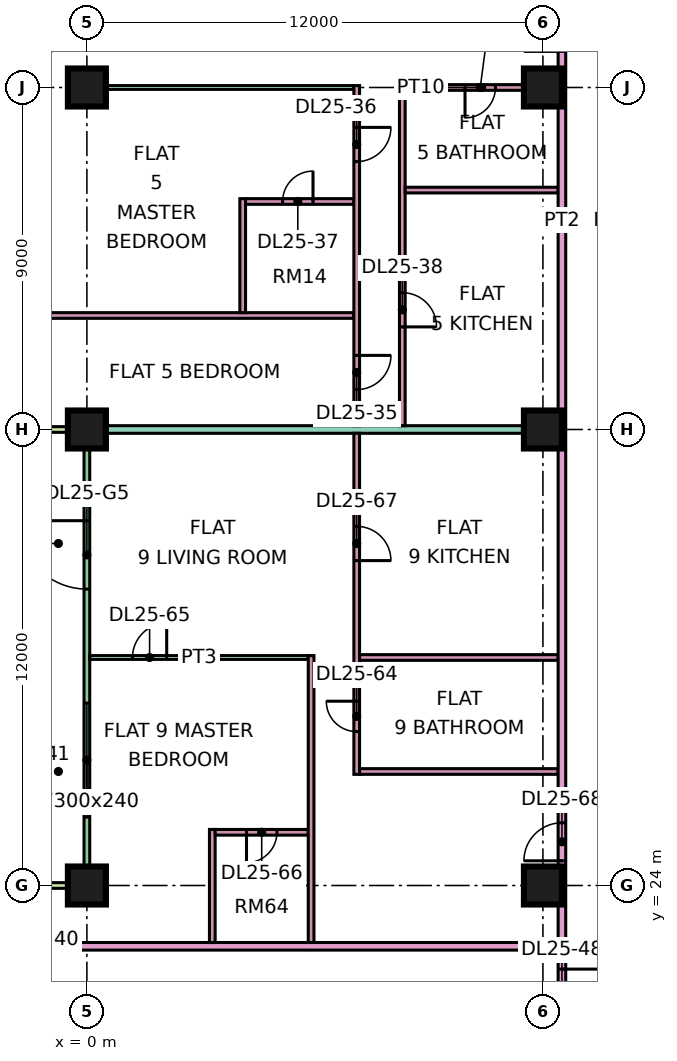
"""IFC4 building model, lengths in metres.
Left out: names, types, materials, properties, quantities, classifications, styles, units other than length and angle.
Written with IfcOpenShell. Run it as: python <this file> out.ifc"""

import sys

from ifc_helpers import new_model, si_unit, direction, frame, frame_2d, origin, origin_2d, place, context, subcontext, project, spatial, rectangle, extrude, element, fill, save


model = new_model("IFC4")
c1 = context("Model", 3, precision=1e-05, world=origin(), true_north=direction((0.0, 1.0)))
c2 = subcontext(c1, "Body", "Model", "MODEL_VIEW")
j1 = project(units=[si_unit("LENGTHUNIT", "METRE"), si_unit("PLANEANGLEUNIT", "RADIAN")], contexts=[c1])
p1 = place(None, origin())
s1 = spatial("IfcSite", under=j1, at=p1, CompositionType="ELEMENT")
p2 = place(p1, origin())
s2 = spatial("IfcBuilding", under=s1, at=p2, CompositionType="ELEMENT")
p3 = place(p2, frame((0.0, 0.0, 110.65)))
s3 = spatial("IfcBuildingStorey", under=s2, at=p3, CompositionType="ELEMENT", Elevation=110.65)
p4 = place(p3, frame((0.0, 24.0, 0.0), z_axis=(0.0, 0.0, 1.0), x_axis=(1.0, 0.0, 0.0)))
e1 = element("IfcColumn", 1, at=p4, inside=s3, PredefinedType="COLUMN", context=c2, shape_type="SweptSolid", body=[
    extrude(rectangle(XDim=1.0, YDim=1.0, at=origin_2d()), origin(), (0.0, 0.0, 1.0), 3.75),
])
p5 = place(p3, frame((0.0, 36.0, 0.0), z_axis=(0.0, 0.0, 1.0), x_axis=(1.0, 0.0, 0.0)))
e2 = element("IfcColumn", 2, at=p5, inside=s3, PredefinedType="COLUMN", context=c2, shape_type="SweptSolid", body=[
    extrude(rectangle(XDim=1.0, YDim=1.0, at=origin_2d()), origin(), (0.0, 0.0, 1.0), 3.75),
])
p6 = place(p3, frame((0.0, 45.0, 0.0), z_axis=(0.0, 0.0, 1.0), x_axis=(1.0, 0.0, 0.0)))
e3 = element("IfcColumn", 3, at=p6, inside=s3, PredefinedType="COLUMN", context=c2, shape_type="SweptSolid", body=[
    extrude(rectangle(XDim=1.0, YDim=1.0, at=origin_2d()), origin(), (0.0, 0.0, 1.0), 3.75),
])
for number, where, z_axis, x_axis in (
    (4, (12.0, 24.0, 0.0), (0.0, 0.0, 1.0), (1.0, 0.0, 0.0)),
    (5, (12.0, 36.0, 0.0), (0.0, 0.0, 1.0), (1.0, 0.0, 0.0)),
    (6, (12.0, 45.0, 0.0), (0.0, 0.0, 1.0), (1.0, 0.0, 0.0)),
):
    element("IfcColumn", number, at=place(p3, frame(where, z_axis=z_axis, x_axis=x_axis)), inside=s3, PredefinedType="COLUMN", context=c2, shape_type="SweptSolid", body=[
        extrude(rectangle(XDim=1.0, YDim=1.0, at=origin_2d()), origin(), (0.0, 0.0, 1.0), 3.75),
    ])
p7 = place(p3, frame((0.0, 35.925, 0.0), z_axis=(0.0, 0.0, 1.0), x_axis=(0.0, -1.0, 0.0)))
e7 = element("IfcWall", 7, at=p7, inside=s3, PredefinedType="SOLIDWALL", context=c2, shape_type="SweptSolid", body=[
    extrude(rectangle(XDim=11.85, YDim=0.15, at=frame_2d((5.925, 0.0))), origin(), (0.0, 0.0, 1.0), 3.35),
])
p8 = place(p7, frame((2.325, 0.0, 0.0)))
e8 = element("IfcOpeningElement", 8, at=p8, cuts=e7, PredefinedType="OPENING", context=c2, shape_type="SweptSolid", body=[
    extrude(rectangle(XDim=1.8, YDim=2.4, at=frame_2d((0.9, 1.2))), frame((0.0, 0.085, 0.0), z_axis=(0.0, -1.0, 0.0), x_axis=(1.0, 0.0, 0.0)), (0.0, 0.0, 1.0), 0.17),
])
p9 = place(p7, frame((7.125, 0.0, 0.45)))
e9 = element("IfcOpeningElement", 9, at=p9, cuts=e7, PredefinedType="OPENING", context=c2, shape_type="SweptSolid", body=[
    extrude(rectangle(XDim=3.0, YDim=2.4, at=frame_2d((1.5, 1.2))), frame((0.0, 0.085, 0.0), z_axis=(0.0, -1.0, 0.0), x_axis=(1.0, 0.0, 0.0)), (0.0, 0.0, 1.0), 0.17),
])
for number, where, z_axis, x_axis in (
    (10, (-1.5, 36.0, 0.0), (0.0, 0.0, 1.0), (1.0, 0.0, 0.0)),
    (11, (-1.5, 24.0, 0.0), (0.0, 0.0, 1.0), (1.0, 0.0, 0.0)),
):
    element("IfcWall", number, at=place(p3, frame(where, z_axis=z_axis, x_axis=x_axis)), inside=s3, PredefinedType="SOLIDWALL", context=c2, shape_type="SweptSolid", body=[
        extrude(rectangle(XDim=1.5, YDim=0.15, at=frame_2d((0.75, 0.0))), origin(), (0.0, 0.0, 1.0), 3.35),
    ])
p10 = place(p3, frame((-1.351, 39.0, 0.0), z_axis=(0.0, 0.0, 1.0), x_axis=(1.0, 0.0, 0.0)))
e12 = element("IfcWall", 12, at=p10, inside=s3, PredefinedType="PARTITIONING", context=c2, shape_type="SweptSolid", body=[
    extrude(rectangle(XDim=8.376, YDim=0.15, at=frame_2d((4.188, 0.0))), origin(), (0.0, 0.0, 1.0), 3.35),
])
p11 = place(p3, frame((-1.35, 22.4, 0.0), z_axis=(0.0, 0.0, 1.0), x_axis=(1.0, 0.0, 0.0)))
e13 = element("IfcWall", 13, at=p11, inside=s3, PredefinedType="PARTITIONING", context=c2, shape_type="SweptSolid", body=[
    extrude(rectangle(XDim=13.75, YDim=0.2, at=frame_2d((6.875, 0.0))), origin(), (0.0, 0.0, 1.0), 3.35),
])
e14 = element("IfcWall", 14, at=p5, inside=s3, PredefinedType="PARTITIONING", context=c2, shape_type="SweptSolid", body=[
    extrude(rectangle(XDim=12.4, YDim=0.2, at=frame_2d((6.2, 0.0))), origin(), (0.0, 0.0, 1.0), 3.35),
])
e15 = element("IfcWall", 15, at=p6, inside=s3, PredefinedType="PARTITIONING", context=c2, shape_type="SweptSolid", body=[
    extrude(rectangle(XDim=7.025, YDim=0.1, at=frame_2d((3.512, 0.0))), origin(), (0.0, 0.0, 1.0), 3.35),
])
p12 = place(p3, frame((0.074, 30.0, 0.0), z_axis=(0.0, 0.0, 1.0), x_axis=(1.0, 0.0, 0.0)))
e16 = element("IfcWall", 16, at=p12, inside=s3, PredefinedType="PARTITIONING", context=c2, shape_type="SweptSolid", body=[
    extrude(rectangle(XDim=5.751, YDim=0.1, at=frame_2d((2.875, 0.0))), origin(), (0.0, 0.0, 1.0), 3.35),
])
p13 = place(p12, frame((1.126, 0.0, 0.0)))
e17 = element("IfcOpeningElement", 17, at=p13, cuts=e16, PredefinedType="OPENING", context=c2, shape_type="SweptSolid", body=[
    extrude(rectangle(XDim=0.9, YDim=2.1, at=frame_2d((0.45, 1.05))), frame((0.0, 0.06, 0.0), z_axis=(0.0, -1.0, 0.0), x_axis=(1.0, 0.0, 0.0)), (0.0, 0.0, 1.0), 0.12),
])
p14 = place(p3, frame((3.3, 22.5, 0.0), z_axis=(0.0, 0.0, 1.0), x_axis=(0.0, 1.0, 0.0)))
e18 = element("IfcWall", 18, at=p14, inside=s3, PredefinedType="PARTITIONING", context=c2, shape_type="SweptSolid", body=[
    extrude(rectangle(XDim=2.975, YDim=0.15, at=frame_2d((1.488, 0.0))), origin(), (0.0, 0.0, 1.0), 3.35),
])
p15 = place(p3, frame((3.375, 25.4, 0.0), z_axis=(0.0, 0.0, 1.0), x_axis=(1.0, 0.0, 0.0)))
e19 = element("IfcWall", 19, at=p15, inside=s3, PredefinedType="PARTITIONING", context=c2, shape_type="SweptSolid", body=[
    extrude(rectangle(XDim=2.45, YDim=0.15, at=frame_2d((1.225, 0.0))), origin(), (0.0, 0.0, 1.0), 3.35),
])
p16 = place(p15, frame((0.825, 0.0, 0.0)))
e20 = element("IfcOpeningElement", 20, at=p16, cuts=e19, PredefinedType="OPENING", context=c2, shape_type="SweptSolid", body=[
    extrude(rectangle(XDim=0.8, YDim=2.1, at=frame_2d((0.4, 1.05))), frame((0.0, 0.085, 0.0), z_axis=(0.0, -1.0, 0.0), x_axis=(1.0, 0.0, 0.0)), (0.0, 0.0, 1.0), 0.17),
])
p17 = place(p3, frame((4.1, 39.075, 0.0), z_axis=(0.0, 0.0, 1.0), x_axis=(0.0, 1.0, 0.0)))
e21 = element("IfcWall", 21, at=p17, inside=s3, PredefinedType="PARTITIONING", context=c2, shape_type="SweptSolid", body=[
    extrude(rectangle(XDim=3.0, YDim=0.15, at=frame_2d((1.5, 0.0))), origin(), (0.0, 0.0, 1.0), 3.35),
])
p18 = place(p3, frame((4.175, 42.0, 0.0), z_axis=(0.0, 0.0, 1.0), x_axis=(1.0, 0.0, 0.0)))
e22 = element("IfcWall", 22, at=p18, inside=s3, PredefinedType="PARTITIONING", context=c2, shape_type="SweptSolid", body=[
    extrude(rectangle(XDim=2.85, YDim=0.15, at=frame_2d((1.425, 0.0))), origin(), (0.0, 0.0, 1.0), 3.35),
])
p19 = place(p18, frame((0.975, 0.0, 0.0)))
e23 = element("IfcOpeningElement", 23, at=p19, cuts=e22, PredefinedType="OPENING", context=c2, shape_type="SweptSolid", body=[
    extrude(rectangle(XDim=0.8, YDim=2.1, at=frame_2d((0.4, 1.05))), frame((0.0, 0.085, 0.0), z_axis=(0.0, -1.0, 0.0), x_axis=(1.0, 0.0, 0.0)), (0.0, 0.0, 1.0), 0.17),
])
p20 = place(p3, frame((5.9, 22.5, 0.0), z_axis=(0.0, 0.0, 1.0), x_axis=(0.0, 1.0, 0.0)))
e24 = element("IfcWall", 24, at=p20, inside=s3, PredefinedType="PARTITIONING", context=c2, shape_type="SweptSolid", body=[
    extrude(rectangle(XDim=7.55, YDim=0.15, at=frame_2d((3.775, 0.0))), origin(), (0.0, 0.0, 1.0), 3.35),
])
p21 = place(p3, frame((7.1, 26.925, 0.0), z_axis=(0.0, 0.0, 1.0), x_axis=(0.0, 1.0, 0.0)))
e25 = element("IfcWall", 25, at=p21, inside=s3, PredefinedType="PARTITIONING", context=c2, shape_type="SweptSolid", body=[
    extrude(rectangle(XDim=8.975, YDim=0.15, at=frame_2d((4.487, 0.0))), origin(), (0.0, 0.0, 1.0), 3.35),
])
p22 = place(p21, frame((1.125, 0.0, 0.0)))
e26 = element("IfcOpeningElement", 26, at=p22, cuts=e25, PredefinedType="OPENING", context=c2, shape_type="SweptSolid", body=[
    extrude(rectangle(XDim=0.8, YDim=2.1, at=frame_2d((0.4, 1.05))), frame((0.0, 0.085, 0.0), z_axis=(0.0, -1.0, 0.0), x_axis=(1.0, 0.0, 0.0)), (0.0, 0.0, 1.0), 0.17),
])
p23 = place(p21, frame((5.625, 0.0, 0.0)))
e27 = element("IfcOpeningElement", 27, at=p23, cuts=e25, PredefinedType="OPENING", context=c2, shape_type="SweptSolid", body=[
    extrude(rectangle(XDim=0.9, YDim=2.1, at=frame_2d((0.45, 1.05))), frame((0.0, 0.085, 0.0), z_axis=(0.0, -1.0, 0.0), x_axis=(1.0, 0.0, 0.0)), (0.0, 0.0, 1.0), 0.17),
])
p24 = place(p3, frame((7.1, 36.1, 0.0), z_axis=(0.0, 0.0, 1.0), x_axis=(0.0, 1.0, 0.0)))
e28 = element("IfcWall", 28, at=p24, inside=s3, PredefinedType="PARTITIONING", context=c2, shape_type="SweptSolid", body=[
    extrude(rectangle(XDim=8.95, YDim=0.15, at=frame_2d((4.475, 0.0))), origin(), (0.0, 0.0, 1.0), 3.35),
])
p25 = place(p24, frame((0.95, 0.0, 0.0)))
e29 = element("IfcOpeningElement", 29, at=p25, cuts=e28, PredefinedType="OPENING", context=c2, shape_type="SweptSolid", body=[
    extrude(rectangle(XDim=0.9, YDim=2.1, at=frame_2d((0.45, 1.05))), frame((0.0, 0.085, 0.0), z_axis=(0.0, -1.0, 0.0), x_axis=(1.0, 0.0, 0.0)), (0.0, 0.0, 1.0), 0.17),
])
p26 = place(p24, frame((6.95, 0.0, 0.0)))
e30 = element("IfcOpeningElement", 30, at=p26, cuts=e28, PredefinedType="OPENING", context=c2, shape_type="SweptSolid", body=[
    extrude(rectangle(XDim=0.9, YDim=2.1, at=frame_2d((0.45, 1.05))), frame((0.0, 0.085, 0.0), z_axis=(0.0, -1.0, 0.0), x_axis=(1.0, 0.0, 0.0)), (0.0, 0.0, 1.0), 0.17),
])
for number, where, z_axis, x_axis in (
    (31, (7.175, 27.0, 0.0), (0.0, 0.0, 1.0), (1.0, 0.0, 0.0)),
    (32, (7.175, 30.0, 0.0), (0.0, 0.0, 1.0), (1.0, 0.0, 0.0)),
):
    element("IfcWall", number, at=place(p3, frame(where, z_axis=z_axis, x_axis=x_axis)), inside=s3, PredefinedType="PARTITIONING", context=c2, shape_type="SweptSolid", body=[
        extrude(rectangle(XDim=5.225, YDim=0.15, at=frame_2d((2.612, 0.0))), origin(), (0.0, 0.0, 1.0), 3.35),
    ])
p27 = place(p3, frame((8.3, 36.1, 0.0), z_axis=(0.0, 0.0, 1.0), x_axis=(0.0, 1.0, 0.0)))
e33 = element("IfcWall", 33, at=p27, inside=s3, PredefinedType="PARTITIONING", context=c2, shape_type="SweptSolid", body=[
    extrude(rectangle(XDim=8.975, YDim=0.15, at=frame_2d((4.487, 0.0))), origin(), (0.0, 0.0, 1.0), 3.35),
])
p28 = place(p27, frame((2.6, 0.0, 0.0)))
e34 = element("IfcOpeningElement", 34, at=p28, cuts=e33, PredefinedType="OPENING", context=c2, shape_type="SweptSolid", body=[
    extrude(rectangle(XDim=0.9, YDim=2.1, at=frame_2d((0.45, 1.05))), frame((0.0, 0.085, 0.0), z_axis=(0.0, -1.0, 0.0), x_axis=(1.0, 0.0, 0.0)), (0.0, 0.0, 1.0), 0.17),
])
p29 = place(p3, frame((8.375, 42.3, 0.0), z_axis=(0.0, 0.0, 1.0), x_axis=(1.0, 0.0, 0.0)))
e35 = element("IfcWall", 35, at=p29, inside=s3, PredefinedType="PARTITIONING", context=c2, shape_type="SweptSolid", body=[
    extrude(rectangle(XDim=4.025, YDim=0.15, at=frame_2d((2.012, 0.0))), origin(), (0.0, 0.0, 1.0), 3.35),
])
p30 = place(p3, frame((8.375, 45.0, 0.0), z_axis=(0.0, 0.0, 1.0), x_axis=(1.0, 0.0, 0.0)))
e36 = element("IfcWall", 36, at=p30, inside=s3, PredefinedType="PARTITIONING", context=c2, shape_type="SweptSolid", body=[
    extrude(rectangle(XDim=4.025, YDim=0.15, at=frame_2d((2.012, 0.0))), origin(), (0.0, 0.0, 1.0), 3.35),
])
p31 = place(p30, frame((1.575, 0.0, 0.0)))
e37 = element("IfcOpeningElement", 37, at=p31, cuts=e36, PredefinedType="OPENING", context=c2, shape_type="SweptSolid", body=[
    extrude(rectangle(XDim=0.8, YDim=2.1, at=frame_2d((0.4, 1.05))), frame((0.0, 0.085, 0.0), z_axis=(0.0, -1.0, 0.0), x_axis=(1.0, 0.0, 0.0)), (0.0, 0.0, 1.0), 0.17),
])
p32 = place(p3, frame((12.5, 20.0, 0.0), z_axis=(0.0, 0.0, 1.0), x_axis=(0.0, 1.0, 0.0)))
e38 = element("IfcWall", 38, at=p32, inside=s3, PredefinedType="PARTITIONING", context=c2, shape_type="SweptSolid", body=[
    extrude(rectangle(XDim=43.0, YDim=0.2, at=frame_2d((21.5, 0.0))), origin(), (0.0, 0.0, 1.0), 3.35),
])
p33 = place(p32, frame((25.95, 0.0, 0.0)))
e39 = element("IfcOpeningElement", 39, at=p33, cuts=e38, PredefinedType="OPENING", context=c2, shape_type="SweptSolid", body=[
    extrude(rectangle(XDim=1.0, YDim=2.1, at=frame_2d((0.5, 1.05))), frame((0.0, 0.11, 0.0), z_axis=(0.0, -1.0, 0.0), x_axis=(1.0, 0.0, 0.0)), (0.0, 0.0, 1.0), 0.22),
])
p34 = place(p32, frame((29.25, 0.0, 0.0)))
e40 = element("IfcOpeningElement", 40, at=p34, cuts=e38, PredefinedType="OPENING", context=c2, shape_type="SweptSolid", body=[
    extrude(rectangle(XDim=1.0, YDim=2.1, at=frame_2d((0.5, 1.05))), frame((0.0, 0.11, 0.0), z_axis=(0.0, -1.0, 0.0), x_axis=(1.0, 0.0, 0.0)), (0.0, 0.0, 1.0), 0.22),
])
p35 = place(p32, frame((0.6, 0.0, 0.0)))
e41 = element("IfcOpeningElement", 41, at=p35, cuts=e38, PredefinedType="OPENING", context=c2, shape_type="SweptSolid", body=[
    extrude(rectangle(XDim=1.2, YDim=2.1, at=frame_2d((0.6, 1.05))), frame((0.0, 0.11, 0.0), z_axis=(0.0, -1.0, 0.0), x_axis=(1.0, 0.0, 0.0)), (0.0, 0.0, 1.0), 0.22),
])
p36 = place(p32, frame((4.65, 0.0, 0.0)))
e42 = element("IfcOpeningElement", 42, at=p36, cuts=e38, PredefinedType="OPENING", context=c2, shape_type="SweptSolid", body=[
    extrude(rectangle(XDim=1.0, YDim=2.1, at=frame_2d((0.5, 1.05))), frame((0.0, 0.11, 0.0), z_axis=(0.0, -1.0, 0.0), x_axis=(1.0, 0.0, 0.0)), (0.0, 0.0, 1.0), 0.22),
])
p37 = place(p8, frame((1.8, 0.0, 0.0), z_axis=(0.0, 0.0, 1.0), x_axis=(-1.0, 0.0, 0.0)))
e43 = element("IfcDoor", 43, at=p37, inside=s3, OperationType="DOUBLE_DOOR_SINGLE_SWING", PredefinedType="DOOR", context=c2, shape_type="SweptSolid", body=[
    extrude(rectangle(XDim=1.8, YDim=2.4, at=frame_2d((0.9, 1.2))), frame((0.0, 0.025, 0.0), z_axis=(0.0, -1.0, 0.0), x_axis=(1.0, 0.0, 0.0)), (0.0, 0.0, 1.0), 0.05),
])
fill(e8, e43)
p38 = place(p9, origin())
e44 = element("IfcWindow", 44, at=p38, inside=s3, PartitioningType="SINGLE_PANEL", PredefinedType="WINDOW", context=c2, shape_type="SweptSolid", body=[
    extrude(rectangle(XDim=3.0, YDim=2.4, at=frame_2d((1.5, 1.2))), frame((0.0, 0.03, 0.0), z_axis=(0.0, -1.0, 0.0), x_axis=(1.0, 0.0, 0.0)), (0.0, 0.0, 1.0), 0.06),
])
fill(e9, e44)
p39 = place(p31, frame((0.8, 0.0, 0.0), z_axis=(0.0, 0.0, 1.0), x_axis=(-1.0, 0.0, 0.0)))
e45 = element("IfcDoor", 45, at=p39, inside=s3, OperationType="SINGLE_SWING_LEFT", PredefinedType="DOOR", context=c2, shape_type="SweptSolid", body=[
    extrude(rectangle(XDim=0.8, YDim=2.1, at=frame_2d((0.4, 1.05))), frame((0.0, 0.025, 0.0), z_axis=(0.0, -1.0, 0.0), x_axis=(1.0, 0.0, 0.0)), (0.0, 0.0, 1.0), 0.05),
])
fill(e37, e45)
p40 = place(p25, origin())
e46 = element("IfcDoor", 46, at=p40, inside=s3, OperationType="SINGLE_SWING_RIGHT", PredefinedType="DOOR", context=c2, shape_type="SweptSolid", body=[
    extrude(rectangle(XDim=0.9, YDim=2.1, at=frame_2d((0.45, 1.05))), frame((0.0, 0.025, 0.0), z_axis=(0.0, -1.0, 0.0), x_axis=(1.0, 0.0, 0.0)), (0.0, 0.0, 1.0), 0.05),
])
fill(e29, e46)
p41 = place(p26, origin())
e47 = element("IfcDoor", 47, at=p41, inside=s3, OperationType="SINGLE_SWING_RIGHT", PredefinedType="DOOR", context=c2, shape_type="SweptSolid", body=[
    extrude(rectangle(XDim=0.9, YDim=2.1, at=frame_2d((0.45, 1.05))), frame((0.0, 0.025, 0.0), z_axis=(0.0, -1.0, 0.0), x_axis=(1.0, 0.0, 0.0)), (0.0, 0.0, 1.0), 0.05),
])
fill(e30, e47)
p42 = place(p19, frame((0.8, 0.0, 0.0), z_axis=(0.0, 0.0, 1.0), x_axis=(-1.0, 0.0, 0.0)))
e48 = element("IfcDoor", 48, at=p42, inside=s3, OperationType="SINGLE_SWING_RIGHT", PredefinedType="DOOR", context=c2, shape_type="SweptSolid", body=[
    extrude(rectangle(XDim=0.8, YDim=2.1, at=frame_2d((0.4, 1.05))), frame((0.0, 0.025, 0.0), z_axis=(0.0, -1.0, 0.0), x_axis=(1.0, 0.0, 0.0)), (0.0, 0.0, 1.0), 0.05),
])
fill(e23, e48)
p43 = place(p28, frame((0.9, 0.0, 0.0), z_axis=(0.0, 0.0, 1.0), x_axis=(-1.0, 0.0, 0.0)))
e49 = element("IfcDoor", 49, at=p43, inside=s3, OperationType="SINGLE_SWING_LEFT", PredefinedType="DOOR", context=c2, shape_type="SweptSolid", body=[
    extrude(rectangle(XDim=0.9, YDim=2.1, at=frame_2d((0.45, 1.05))), frame((0.0, 0.025, 0.0), z_axis=(0.0, -1.0, 0.0), x_axis=(1.0, 0.0, 0.0)), (0.0, 0.0, 1.0), 0.05),
])
fill(e34, e49)
p44 = place(p35, origin())
e50 = element("IfcDoor", 50, at=p44, inside=s3, OperationType="SINGLE_SWING_RIGHT", PredefinedType="DOOR", context=c2, shape_type="SweptSolid", body=[
    extrude(rectangle(XDim=1.2, YDim=2.1, at=frame_2d((0.6, 1.05))), frame((0.0, 0.025, 0.0), z_axis=(0.0, -1.0, 0.0), x_axis=(1.0, 0.0, 0.0)), (0.0, 0.0, 1.0), 0.05),
])
fill(e41, e50)
p45 = place(p22, frame((0.8, 0.0, 0.0), z_axis=(0.0, 0.0, 1.0), x_axis=(-1.0, 0.0, 0.0)))
e51 = element("IfcDoor", 51, at=p45, inside=s3, OperationType="SINGLE_SWING_RIGHT", PredefinedType="DOOR", context=c2, shape_type="SweptSolid", body=[
    extrude(rectangle(XDim=0.8, YDim=2.1, at=frame_2d((0.4, 1.05))), frame((0.0, 0.025, 0.0), z_axis=(0.0, -1.0, 0.0), x_axis=(1.0, 0.0, 0.0)), (0.0, 0.0, 1.0), 0.05),
])
fill(e26, e51)
p46 = place(p13, frame((0.9, 0.0, 0.0), z_axis=(0.0, 0.0, 1.0), x_axis=(-1.0, 0.0, 0.0)))
e52 = element("IfcDoor", 52, at=p46, inside=s3, OperationType="SINGLE_SWING_RIGHT", PredefinedType="DOOR", context=c2, shape_type="SweptSolid", body=[
    extrude(rectangle(XDim=0.9, YDim=2.1, at=frame_2d((0.45, 1.05))), frame((0.0, 0.025, 0.0), z_axis=(0.0, -1.0, 0.0), x_axis=(1.0, 0.0, 0.0)), (0.0, 0.0, 1.0), 0.05),
])
fill(e17, e52)
p47 = place(p16, frame((0.8, 0.0, 0.0), z_axis=(0.0, 0.0, 1.0), x_axis=(-1.0, 0.0, 0.0)))
e53 = element("IfcDoor", 53, at=p47, inside=s3, OperationType="SINGLE_SWING_LEFT", PredefinedType="DOOR", context=c2, shape_type="SweptSolid", body=[
    extrude(rectangle(XDim=0.8, YDim=2.1, at=frame_2d((0.4, 1.05))), frame((0.0, 0.025, 0.0), z_axis=(0.0, -1.0, 0.0), x_axis=(1.0, 0.0, 0.0)), (0.0, 0.0, 1.0), 0.05),
])
fill(e20, e53)
p48 = place(p23, frame((0.9, 0.0, 0.0), z_axis=(0.0, 0.0, 1.0), x_axis=(-1.0, 0.0, 0.0)))
e54 = element("IfcDoor", 54, at=p48, inside=s3, OperationType="SINGLE_SWING_LEFT", PredefinedType="DOOR", context=c2, shape_type="SweptSolid", body=[
    extrude(rectangle(XDim=0.9, YDim=2.1, at=frame_2d((0.45, 1.05))), frame((0.0, 0.025, 0.0), z_axis=(0.0, -1.0, 0.0), x_axis=(1.0, 0.0, 0.0)), (0.0, 0.0, 1.0), 0.05),
])
fill(e27, e54)
p49 = place(p36, origin())
e55 = element("IfcDoor", 55, at=p49, inside=s3, OperationType="SINGLE_SWING_LEFT", PredefinedType="DOOR", context=c2, shape_type="SweptSolid", body=[
    extrude(rectangle(XDim=1.0, YDim=2.1, at=frame_2d((0.5, 1.05))), frame((0.0, 0.025, 0.0), z_axis=(0.0, -1.0, 0.0), x_axis=(1.0, 0.0, 0.0)), (0.0, 0.0, 1.0), 0.05),
])
fill(e42, e55)
save(model, sys.argv[1])
